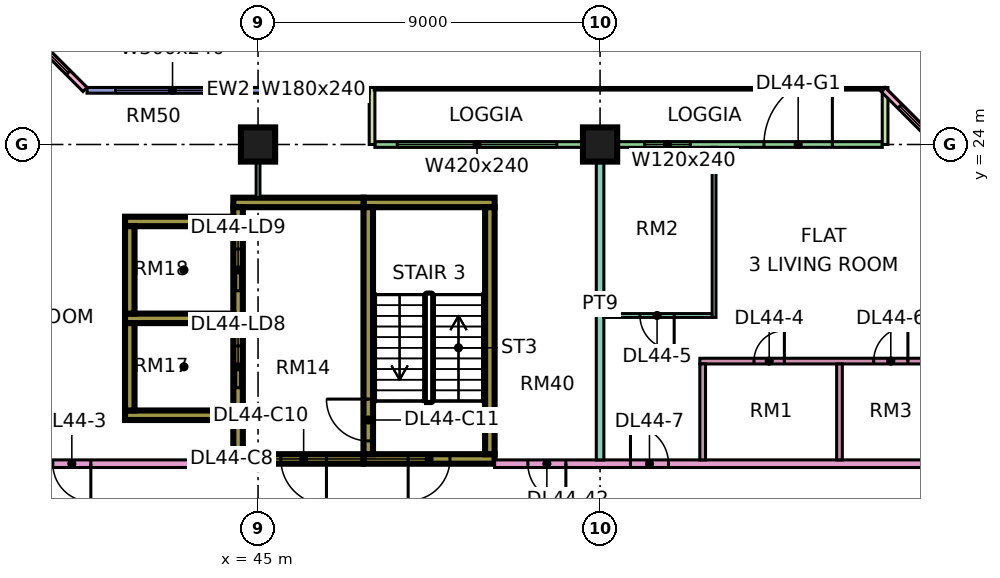
"""IFC4 building model, lengths in metres.
Left out: names, types, materials, properties, quantities, classifications, styles, units other than length and angle.
Written with IfcOpenShell. Run it as: python <this file> out.ifc"""

import sys

from ifc_helpers import new_model, si_unit, direction, frame, frame_2d, origin, origin_2d, place, context, subcontext, project, spatial, rectangle, extrude, element, fill, save


model = new_model("IFC4")
c1 = context("Model", 3, precision=1e-05, world=origin(), true_north=direction((0.0, 1.0)))
c2 = subcontext(c1, "Body", "Model", "MODEL_VIEW")
j1 = project(units=[si_unit("LENGTHUNIT", "METRE"), si_unit("PLANEANGLEUNIT", "RADIAN")], contexts=[c1])
p1 = place(None, origin())
s1 = spatial("IfcSite", under=j1, at=p1, CompositionType="ELEMENT")
p2 = place(p1, origin())
s2 = spatial("IfcBuilding", under=s1, at=p2, CompositionType="ELEMENT")
p3 = place(p2, frame((0.0, 0.0, 191.15)))
s3 = spatial("IfcBuildingStorey", under=s2, at=p3, CompositionType="ELEMENT", Elevation=191.15)
for number, where, z_axis, x_axis in (
    (1, (45.0, 24.0, 0.0), (0.0, 0.0, 1.0), (1.0, 0.0, 0.0)),
    (2, (54.0, 24.0, 0.0), (0.0, 0.0, 1.0), (1.0, 0.0, 0.0)),
):
    element("IfcColumn", number, at=place(p3, frame(where, z_axis=z_axis, x_axis=x_axis)), inside=s3, PredefinedType="COLUMN", context=c2, shape_type="SweptSolid", body=[
        extrude(rectangle(XDim=0.9, YDim=0.9, at=origin_2d()), origin(), (0.0, 0.0, 1.0), 3.75),
    ])
p4 = place(p3, frame((47.775, 15.725, 0.0), z_axis=(0.0, 0.0, 1.0), x_axis=(1.0, 0.0, 0.0)))
e3 = element("IfcWall", 3, at=p4, inside=s3, PredefinedType="SHEAR", context=c2, shape_type="SweptSolid", body=[
    extrude(rectangle(XDim=3.45, YDim=0.25, at=frame_2d((1.725, 0.0))), origin(), (0.0, 0.0, 1.0), 3.75),
])
p5 = place(p4, frame((1.175, 0.0, 0.0)))
e4 = element("IfcOpeningElement", 4, at=p5, cuts=e3, PredefinedType="OPENING", context=c2, shape_type="SweptSolid", body=[
    extrude(rectangle(XDim=1.1, YDim=2.2, at=frame_2d((0.55, 1.1))), frame((0.0, 0.135, 0.0), z_axis=(0.0, -1.0, 0.0), x_axis=(1.0, 0.0, 0.0)), (0.0, 0.0, 1.0), 0.27),
])
p6 = place(p3, frame((47.775, 22.475, 0.0), z_axis=(0.0, 0.0, 1.0), x_axis=(1.0, 0.0, 0.0)))
e5 = element("IfcWall", 5, at=p6, inside=s3, PredefinedType="SHEAR", context=c2, shape_type="SweptSolid", body=[
    extrude(rectangle(XDim=3.45, YDim=0.25, at=frame_2d((1.725, 0.0))), origin(), (0.0, 0.0, 1.0), 3.75),
])
p7 = place(p3, frame((47.9, 15.85, 0.0), z_axis=(0.0, 0.0, 1.0), x_axis=(0.0, 1.0, 0.0)))
e6 = element("IfcWall", 6, at=p7, inside=s3, PredefinedType="SHEAR", context=c2, shape_type="SweptSolid", body=[
    extrude(rectangle(XDim=6.5, YDim=0.25, at=frame_2d((3.25, 0.0))), origin(), (0.0, 0.0, 1.0), 3.75),
])
p8 = place(p7, frame((0.35, 0.0, 0.0)))
e7 = element("IfcOpeningElement", 7, at=p8, cuts=e6, PredefinedType="OPENING", context=c2, shape_type="SweptSolid", body=[
    extrude(rectangle(XDim=1.1, YDim=2.2, at=frame_2d((0.55, 1.1))), frame((0.0, 0.135, 0.0), z_axis=(0.0, -1.0, 0.0), x_axis=(1.0, 0.0, 0.0)), (0.0, 0.0, 1.0), 0.27),
])
p9 = place(p3, frame((51.1, 15.85, 0.0), z_axis=(0.0, 0.0, 1.0), x_axis=(0.0, 1.0, 0.0)))
e8 = element("IfcWall", 8, at=p9, inside=s3, PredefinedType="SHEAR", context=c2, shape_type="SweptSolid", body=[
    extrude(rectangle(XDim=6.5, YDim=0.25, at=frame_2d((3.25, 0.0))), origin(), (0.0, 0.0, 1.0), 3.75),
])
p10 = place(p3, frame((44.35, 15.725, 0.0), z_axis=(0.0, 0.0, 1.0), x_axis=(1.0, 0.0, 0.0)))
e9 = element("IfcWall", 9, at=p10, inside=s3, PredefinedType="SHEAR", context=c2, shape_type="SweptSolid", body=[
    extrude(rectangle(XDim=3.425, YDim=0.25, at=frame_2d((1.712, 0.0))), origin(), (0.0, 0.0, 1.0), 3.75),
])
p11 = place(p10, frame((1.25, 0.0, 0.0)))
e10 = element("IfcOpeningElement", 10, at=p11, cuts=e9, PredefinedType="OPENING", context=c2, shape_type="SweptSolid", body=[
    extrude(rectangle(XDim=1.2, YDim=2.2, at=frame_2d((0.6, 1.1))), frame((0.0, 0.135, 0.0), z_axis=(0.0, -1.0, 0.0), x_axis=(1.0, 0.0, 0.0)), (0.0, 0.0, 1.0), 0.27),
])
p12 = place(p3, frame((44.35, 22.475, 0.0), z_axis=(0.0, 0.0, 1.0), x_axis=(1.0, 0.0, 0.0)))
e11 = element("IfcWall", 11, at=p12, inside=s3, PredefinedType="SHEAR", context=c2, shape_type="SweptSolid", body=[
    extrude(rectangle(XDim=3.425, YDim=0.25, at=frame_2d((1.712, 0.0))), origin(), (0.0, 0.0, 1.0), 3.75),
])
p13 = place(p3, frame((44.475, 15.85, 0.0), z_axis=(0.0, 0.0, 1.0), x_axis=(0.0, 1.0, 0.0)))
e12 = element("IfcWall", 12, at=p13, inside=s3, PredefinedType="SHEAR", context=c2, shape_type="SweptSolid", body=[
    extrude(rectangle(XDim=6.5, YDim=0.25, at=frame_2d((3.25, 0.0))), origin(), (0.0, 0.0, 1.0), 3.75),
])
p14 = place(p13, frame((1.75, 0.0, 0.0)))
e13 = element("IfcOpeningElement", 13, at=p14, cuts=e12, PredefinedType="OPENING", context=c2, shape_type="SweptSolid", body=[
    extrude(rectangle(XDim=1.1, YDim=2.2, at=frame_2d((0.55, 1.1))), frame((0.0, 0.135, 0.0), z_axis=(0.0, -1.0, 0.0), x_axis=(1.0, 0.0, 0.0)), (0.0, 0.0, 1.0), 0.27),
])
p15 = place(p13, frame((4.3, 0.0, 0.0)))
e14 = element("IfcOpeningElement", 14, at=p15, cuts=e12, PredefinedType="OPENING", context=c2, shape_type="SweptSolid", body=[
    extrude(rectangle(XDim=1.1, YDim=2.2, at=frame_2d((0.55, 1.1))), frame((0.0, 0.135, 0.0), z_axis=(0.0, -1.0, 0.0), x_axis=(1.0, 0.0, 0.0)), (0.0, 0.0, 1.0), 0.27),
])
for number, where, z_axis, x_axis in (
    (15, (41.5, 16.875, 0.0), (0.0, 0.0, 1.0), (1.0, 0.0, 0.0)),
    (16, (41.5, 19.425, 0.0), (0.0, 0.0, 1.0), (1.0, 0.0, 0.0)),
    (17, (41.5, 21.975, 0.0), (0.0, 0.0, 1.0), (1.0, 0.0, 0.0)),
):
    element("IfcWall", number, at=place(p3, frame(where, z_axis=z_axis, x_axis=x_axis)), inside=s3, PredefinedType="SHEAR", context=c2, shape_type="SweptSolid", body=[
        extrude(rectangle(XDim=2.85, YDim=0.25, at=frame_2d((1.425, 0.0))), origin(), (0.0, 0.0, 1.0), 3.75),
    ])
for number, where, z_axis, x_axis in (
    (18, (41.625, 17.0, 0.0), (0.0, 0.0, 1.0), (0.0, 1.0, 0.0)),
    (19, (41.625, 19.55, 0.0), (0.0, 0.0, 1.0), (0.0, 1.0, 0.0)),
):
    element("IfcWall", number, at=place(p3, frame(where, z_axis=z_axis, x_axis=x_axis)), inside=s3, PredefinedType="SHEAR", context=c2, shape_type="SweptSolid", body=[
        extrude(rectangle(XDim=2.3, YDim=0.25, at=frame_2d((1.15, 0.0))), origin(), (0.0, 0.0, 1.0), 3.75),
    ])
p16 = place(p3, frame((61.425, 24.0, 0.0), z_axis=(0.0, 0.0, 1.0), x_axis=(-1.0, 0.0, 0.0)))
e20 = element("IfcWall", 20, at=p16, inside=s3, PredefinedType="SOLIDWALL", context=c2, shape_type="SweptSolid", body=[
    extrude(rectangle(XDim=13.35, YDim=0.15, at=frame_2d((6.675, 0.0))), origin(), (0.0, 0.0, 1.0), 3.35),
])
p17 = place(p16, frame((1.312, 0.0, 0.0)))
e21 = element("IfcOpeningElement", 21, at=p17, cuts=e20, PredefinedType="OPENING", context=c2, shape_type="SweptSolid", body=[
    extrude(rectangle(XDim=1.8, YDim=2.4, at=frame_2d((0.9, 1.2))), frame((0.0, 0.085, 0.0), z_axis=(0.0, -1.0, 0.0), x_axis=(1.0, 0.0, 0.0)), (0.0, 0.0, 1.0), 0.17),
])
p18 = place(p16, frame((5.05, 0.0, 0.45)))
e22 = element("IfcOpeningElement", 22, at=p18, cuts=e20, PredefinedType="OPENING", context=c2, shape_type="SweptSolid", body=[
    extrude(rectangle(XDim=1.2, YDim=2.4, at=frame_2d((0.6, 1.2))), frame((0.0, 0.085, 0.0), z_axis=(0.0, -1.0, 0.0), x_axis=(1.0, 0.0, 0.0)), (0.0, 0.0, 1.0), 0.17),
])
p19 = place(p16, frame((8.562, 0.0, 0.45)))
e23 = element("IfcOpeningElement", 23, at=p19, cuts=e20, PredefinedType="OPENING", context=c2, shape_type="SweptSolid", body=[
    extrude(rectangle(XDim=4.2, YDim=2.4, at=frame_2d((2.1, 1.2))), frame((0.0, 0.085, 0.0), z_axis=(0.0, -1.0, 0.0), x_axis=(1.0, 0.0, 0.0)), (0.0, 0.0, 1.0), 0.17),
])
for number, where, z_axis, x_axis in (
    (24, (61.5, 25.5, 0.0), (0.0, 0.0, 1.0), (0.0, -1.0, 0.0)),
    (25, (48.0, 25.5, 0.0), (0.0, 0.0, 1.0), (0.0, -1.0, 0.0)),
):
    element("IfcWall", number, at=place(p3, frame(where, z_axis=z_axis, x_axis=x_axis)), inside=s3, PredefinedType="SOLIDWALL", context=c2, shape_type="SweptSolid", body=[
        extrude(rectangle(XDim=1.5, YDim=0.15, at=frame_2d((0.75, 0.0))), origin(), (0.0, 0.0, 1.0), 3.35),
    ])
p20 = place(p3, frame((47.925, 25.425, 0.0), z_axis=(0.0, 0.0, 1.0), x_axis=(-1.0, 0.0, 0.0)))
e26 = element("IfcWall", 26, at=p20, inside=s3, PredefinedType="SOLIDWALL", context=c2, shape_type="SweptSolid", body=[
    extrude(rectangle(XDim=7.425, YDim=0.15, at=frame_2d((3.712, 0.0))), origin(), (0.0, 0.0, 1.0), 3.35),
])
p21 = place(p20, frame((0.562, 0.0, 0.45)))
e27 = element("IfcOpeningElement", 27, at=p21, cuts=e26, PredefinedType="OPENING", context=c2, shape_type="SweptSolid", body=[
    extrude(rectangle(XDim=1.8, YDim=2.4, at=frame_2d((0.9, 1.2))), frame((0.0, 0.085, 0.0), z_axis=(0.0, -1.0, 0.0), x_axis=(1.0, 0.0, 0.0)), (0.0, 0.0, 1.0), 0.17),
])
p22 = place(p20, frame((3.675, 0.0, 0.45)))
e28 = element("IfcOpeningElement", 28, at=p22, cuts=e26, PredefinedType="OPENING", context=c2, shape_type="SweptSolid", body=[
    extrude(rectangle(XDim=3.0, YDim=2.4, at=frame_2d((1.5, 1.2))), frame((0.0, 0.085, 0.0), z_axis=(0.0, -1.0, 0.0), x_axis=(1.0, 0.0, 0.0)), (0.0, 0.0, 1.0), 0.17),
])
p23 = place(p3, frame((40.447, 25.447, 0.0), z_axis=(0.0, 0.0, 1.0), x_axis=(-0.707106781187, 0.707106781187, 0.0)))
e29 = element("IfcWall", 29, at=p23, inside=s3, PredefinedType="SOLIDWALL", context=c2, shape_type="SweptSolid", body=[
    extrude(rectangle(XDim=4.243, YDim=0.15, at=frame_2d((2.121, 0.0))), origin(), (0.0, 0.0, 1.0), 3.35),
])
p24 = place(p23, frame((0.621, 0.0, 0.45)))
e30 = element("IfcOpeningElement", 30, at=p24, cuts=e29, PredefinedType="OPENING", context=c2, shape_type="SweptSolid", body=[
    extrude(rectangle(XDim=3.0, YDim=2.4, at=frame_2d((1.5, 1.2))), frame((0.0, 0.085, 0.0), z_axis=(0.0, -1.0, 0.0), x_axis=(1.0, 0.0, 0.0)), (0.0, 0.0, 1.0), 0.17),
])
p25 = place(p3, frame((64.447, 22.447, 0.0), z_axis=(0.0, 0.0, 1.0), x_axis=(-0.707106781187, 0.707106781187, 0.0)))
e31 = element("IfcWall", 31, at=p25, inside=s3, PredefinedType="SOLIDWALL", context=c2, shape_type="SweptSolid", body=[
    extrude(rectangle(XDim=4.243, YDim=0.15, at=frame_2d((2.121, 0.0))), origin(), (0.0, 0.0, 1.0), 3.35),
])
p26 = place(p25, frame((0.621, 0.0, 0.45)))
e32 = element("IfcOpeningElement", 32, at=p26, cuts=e31, PredefinedType="OPENING", context=c2, shape_type="SweptSolid", body=[
    extrude(rectangle(XDim=3.0, YDim=2.4, at=frame_2d((1.5, 1.2))), frame((0.0, 0.085, 0.0), z_axis=(0.0, -1.0, 0.0), x_axis=(1.0, 0.0, 0.0)), (0.0, 0.0, 1.0), 0.17),
])
p27 = place(p3, frame((34.0, 15.6, 0.0), z_axis=(0.0, 0.0, 1.0), x_axis=(1.0, 0.0, 0.0)))
e33 = element("IfcWall", 33, at=p27, inside=s3, PredefinedType="PARTITIONING", context=c2, shape_type="SweptSolid", body=[
    extrude(rectangle(XDim=10.35, YDim=0.2, at=frame_2d((5.175, 0.0))), origin(), (0.0, 0.0, 1.0), 3.35),
])
p28 = place(p27, frame((5.6, 0.0, 0.0)))
e34 = element("IfcOpeningElement", 34, at=p28, cuts=e33, PredefinedType="OPENING", context=c2, shape_type="SweptSolid", body=[
    extrude(rectangle(XDim=1.0, YDim=2.1, at=frame_2d((0.5, 1.05))), frame((0.0, 0.11, 0.0), z_axis=(0.0, -1.0, 0.0), x_axis=(1.0, 0.0, 0.0)), (0.0, 0.0, 1.0), 0.22),
])
p29 = place(p27, frame((0.45, 0.0, 0.0)))
e35 = element("IfcOpeningElement", 35, at=p29, cuts=e33, PredefinedType="OPENING", context=c2, shape_type="SweptSolid", body=[
    extrude(rectangle(XDim=1.2, YDim=2.1, at=frame_2d((0.6, 1.05))), frame((0.0, 0.11, 0.0), z_axis=(0.0, -1.0, 0.0), x_axis=(1.0, 0.0, 0.0)), (0.0, 0.0, 1.0), 0.22),
])
p30 = place(p3, frame((45.0, 22.6, 0.0), z_axis=(0.0, 0.0, 1.0), x_axis=(0.0, 1.0, 0.0)))
e36 = element("IfcWall", 36, at=p30, inside=s3, PredefinedType="PARTITIONING", context=c2, shape_type="SweptSolid", body=[
    extrude(rectangle(XDim=1.4, YDim=0.1, at=frame_2d((0.7, 0.0))), origin(), (0.0, 0.0, 1.0), 3.35),
])
p31 = place(p3, frame((51.225, 15.6, 0.0), z_axis=(0.0, 0.0, 1.0), x_axis=(1.0, 0.0, 0.0)))
e37 = element("IfcWall", 37, at=p31, inside=s3, PredefinedType="PARTITIONING", context=c2, shape_type="SweptSolid", body=[
    extrude(rectangle(XDim=13.125, YDim=0.2, at=frame_2d((6.562, 0.0))), origin(), (0.0, 0.0, 1.0), 3.35),
])
p32 = place(p31, frame((3.575, 0.0, 0.0)))
e38 = element("IfcOpeningElement", 38, at=p32, cuts=e37, PredefinedType="OPENING", context=c2, shape_type="SweptSolid", body=[
    extrude(rectangle(XDim=1.0, YDim=2.1, at=frame_2d((0.5, 1.05))), frame((0.0, 0.11, 0.0), z_axis=(0.0, -1.0, 0.0), x_axis=(1.0, 0.0, 0.0)), (0.0, 0.0, 1.0), 0.22),
])
p33 = place(p31, frame((0.875, 0.0, 0.0)))
e39 = element("IfcOpeningElement", 39, at=p33, cuts=e37, PredefinedType="OPENING", context=c2, shape_type="SweptSolid", body=[
    extrude(rectangle(XDim=1.0, YDim=2.1, at=frame_2d((0.5, 1.05))), frame((0.0, 0.11, 0.0), z_axis=(0.0, -1.0, 0.0), x_axis=(1.0, 0.0, 0.0)), (0.0, 0.0, 1.0), 0.22),
])
p34 = place(p3, frame((54.0, 15.7, 0.0), z_axis=(0.0, 0.0, 1.0), x_axis=(0.0, 1.0, 0.0)))
e40 = element("IfcWall", 40, at=p34, inside=s3, PredefinedType="PARTITIONING", context=c2, shape_type="SweptSolid", body=[
    extrude(rectangle(XDim=8.226, YDim=0.2, at=frame_2d((4.113, 0.0))), origin(), (0.0, 0.0, 1.0), 3.35),
])
p35 = place(p3, frame((54.1, 19.5, 0.0), z_axis=(0.0, 0.0, 1.0), x_axis=(1.0, 0.0, 0.0)))
e41 = element("IfcWall", 41, at=p35, inside=s3, PredefinedType="PARTITIONING", context=c2, shape_type="SweptSolid", body=[
    extrude(rectangle(XDim=2.85, YDim=0.1, at=frame_2d((1.425, 0.0))), origin(), (0.0, 0.0, 1.0), 3.35),
])
p36 = place(p35, frame((0.95, 0.0, 0.0)))
e42 = element("IfcOpeningElement", 42, at=p36, cuts=e41, PredefinedType="OPENING", context=c2, shape_type="SweptSolid", body=[
    extrude(rectangle(XDim=0.9, YDim=2.1, at=frame_2d((0.45, 1.05))), frame((0.0, 0.06, 0.0), z_axis=(0.0, -1.0, 0.0), x_axis=(1.0, 0.0, 0.0)), (0.0, 0.0, 1.0), 0.12),
])
p37 = place(p3, frame((56.625, 18.3, 0.0), z_axis=(0.0, 0.0, 1.0), x_axis=(1.0, 0.0, 0.0)))
e43 = element("IfcWall", 43, at=p37, inside=s3, PredefinedType="PARTITIONING", context=c2, shape_type="SweptSolid", body=[
    extrude(rectangle(XDim=7.725, YDim=0.15, at=frame_2d((3.863, 0.0))), origin(), (0.0, 0.0, 1.0), 3.35),
])
p38 = place(p37, frame((1.425, 0.0, 0.0)))
e44 = element("IfcOpeningElement", 44, at=p38, cuts=e43, PredefinedType="OPENING", context=c2, shape_type="SweptSolid", body=[
    extrude(rectangle(XDim=0.8, YDim=2.1, at=frame_2d((0.4, 1.05))), frame((0.0, 0.085, 0.0), z_axis=(0.0, -1.0, 0.0), x_axis=(1.0, 0.0, 0.0)), (0.0, 0.0, 1.0), 0.17),
])
p39 = place(p37, frame((4.575, 0.0, 0.0)))
e45 = element("IfcOpeningElement", 45, at=p39, cuts=e43, PredefinedType="OPENING", context=c2, shape_type="SweptSolid", body=[
    extrude(rectangle(XDim=0.9, YDim=2.1, at=frame_2d((0.45, 1.05))), frame((0.0, 0.085, 0.0), z_axis=(0.0, -1.0, 0.0), x_axis=(1.0, 0.0, 0.0)), (0.0, 0.0, 1.0), 0.17),
])
p40 = place(p3, frame((56.7, 15.7, 0.0), z_axis=(0.0, 0.0, 1.0), x_axis=(0.0, 1.0, 0.0)))
e46 = element("IfcWall", 46, at=p40, inside=s3, PredefinedType="PARTITIONING", context=c2, shape_type="SweptSolid", body=[
    extrude(rectangle(XDim=2.525, YDim=0.15, at=frame_2d((1.263, 0.0))), origin(), (0.0, 0.0, 1.0), 3.35),
])
p41 = place(p3, frame((57.0, 19.45, 0.0), z_axis=(0.0, 0.0, 1.0), x_axis=(0.0, 1.0, 0.0)))
e47 = element("IfcWall", 47, at=p41, inside=s3, PredefinedType="PARTITIONING", context=c2, shape_type="SweptSolid", body=[
    extrude(rectangle(XDim=4.476, YDim=0.1, at=frame_2d((2.238, 0.0))), origin(), (0.0, 0.0, 1.0), 3.35),
])
p42 = place(p3, frame((60.3, 15.7, 0.0), z_axis=(0.0, 0.0, 1.0), x_axis=(0.0, 1.0, 0.0)))
e48 = element("IfcWall", 48, at=p42, inside=s3, PredefinedType="PARTITIONING", context=c2, shape_type="SweptSolid", body=[
    extrude(rectangle(XDim=2.525, YDim=0.15, at=frame_2d((1.263, 0.0))), origin(), (0.0, 0.0, 1.0), 3.35),
])
p43 = place(p17, frame((1.8, 0.0, 0.0), z_axis=(0.0, 0.0, 1.0), x_axis=(-1.0, 0.0, 0.0)))
e49 = element("IfcDoor", 49, at=p43, inside=s3, OperationType="DOUBLE_DOOR_SINGLE_SWING", PredefinedType="DOOR", context=c2, shape_type="SweptSolid", body=[
    extrude(rectangle(XDim=1.8, YDim=2.4, at=frame_2d((0.9, 1.2))), frame((0.0, 0.025, 0.0), z_axis=(0.0, -1.0, 0.0), x_axis=(1.0, 0.0, 0.0)), (0.0, 0.0, 1.0), 0.05),
])
fill(e21, e49)
p44 = place(p18, origin())
e50 = element("IfcWindow", 50, at=p44, inside=s3, PartitioningType="SINGLE_PANEL", PredefinedType="WINDOW", context=c2, shape_type="SweptSolid", body=[
    extrude(rectangle(XDim=1.2, YDim=2.4, at=frame_2d((0.6, 1.2))), frame((0.0, 0.03, 0.0), z_axis=(0.0, -1.0, 0.0), x_axis=(1.0, 0.0, 0.0)), (0.0, 0.0, 1.0), 0.06),
])
fill(e22, e50)
p45 = place(p19, origin())
e51 = element("IfcWindow", 51, at=p45, inside=s3, PartitioningType="SINGLE_PANEL", PredefinedType="WINDOW", context=c2, shape_type="SweptSolid", body=[
    extrude(rectangle(XDim=4.2, YDim=2.4, at=frame_2d((2.1, 1.2))), frame((0.0, 0.03, 0.0), z_axis=(0.0, -1.0, 0.0), x_axis=(1.0, 0.0, 0.0)), (0.0, 0.0, 1.0), 0.06),
])
fill(e23, e51)
p46 = place(p21, origin())
e52 = element("IfcWindow", 52, at=p46, inside=s3, PartitioningType="SINGLE_PANEL", PredefinedType="WINDOW", context=c2, shape_type="SweptSolid", body=[
    extrude(rectangle(XDim=1.8, YDim=2.4, at=frame_2d((0.9, 1.2))), frame((0.0, 0.03, 0.0), z_axis=(0.0, -1.0, 0.0), x_axis=(1.0, 0.0, 0.0)), (0.0, 0.0, 1.0), 0.06),
])
fill(e27, e52)
p47 = place(p22, origin())
e53 = element("IfcWindow", 53, at=p47, inside=s3, PartitioningType="SINGLE_PANEL", PredefinedType="WINDOW", context=c2, shape_type="SweptSolid", body=[
    extrude(rectangle(XDim=3.0, YDim=2.4, at=frame_2d((1.5, 1.2))), frame((0.0, 0.03, 0.0), z_axis=(0.0, -1.0, 0.0), x_axis=(1.0, 0.0, 0.0)), (0.0, 0.0, 1.0), 0.06),
])
fill(e28, e53)
p48 = place(p24, origin())
e54 = element("IfcWindow", 54, at=p48, inside=s3, PartitioningType="SINGLE_PANEL", PredefinedType="WINDOW", context=c2, shape_type="SweptSolid", body=[
    extrude(rectangle(XDim=3.0, YDim=2.4, at=frame_2d((1.5, 1.2))), frame((0.0, 0.03, 0.0), z_axis=(0.0, -1.0, 0.0), x_axis=(1.0, 0.0, 0.0)), (0.0, 0.0, 1.0), 0.06),
])
fill(e30, e54)
p49 = place(p26, origin())
e55 = element("IfcWindow", 55, at=p49, inside=s3, PartitioningType="SINGLE_PANEL", PredefinedType="WINDOW", context=c2, shape_type="SweptSolid", body=[
    extrude(rectangle(XDim=3.0, YDim=2.4, at=frame_2d((1.5, 1.2))), frame((0.0, 0.03, 0.0), z_axis=(0.0, -1.0, 0.0), x_axis=(1.0, 0.0, 0.0)), (0.0, 0.0, 1.0), 0.06),
])
fill(e32, e55)
p50 = place(p5, frame((1.1, 0.0, 0.0), z_axis=(0.0, 0.0, 1.0), x_axis=(-1.0, 0.0, 0.0)))
e56 = element("IfcDoor", 56, at=p50, inside=s3, OperationType="SINGLE_SWING_LEFT", PredefinedType="DOOR", context=c2, shape_type="SweptSolid", body=[
    extrude(rectangle(XDim=1.1, YDim=2.2, at=frame_2d((0.55, 1.1))), frame((0.0, 0.025, 0.0), z_axis=(0.0, -1.0, 0.0), x_axis=(1.0, 0.0, 0.0)), (0.0, 0.0, 1.0), 0.05),
])
fill(e4, e56)
p51 = place(p11, origin())
e57 = element("IfcDoor", 57, at=p51, inside=s3, OperationType="SINGLE_SWING_RIGHT", PredefinedType="DOOR", context=c2, shape_type="SweptSolid", body=[
    extrude(rectangle(XDim=1.2, YDim=2.2, at=frame_2d((0.6, 1.1))), frame((0.0, 0.025, 0.0), z_axis=(0.0, -1.0, 0.0), x_axis=(1.0, 0.0, 0.0)), (0.0, 0.0, 1.0), 0.05),
])
fill(e10, e57)
p52 = place(p8, frame((1.1, 0.0, 0.0), z_axis=(0.0, 0.0, 1.0), x_axis=(-1.0, 0.0, 0.0)))
e58 = element("IfcDoor", 58, at=p52, inside=s3, OperationType="SINGLE_SWING_RIGHT", PredefinedType="DOOR", context=c2, shape_type="SweptSolid", body=[
    extrude(rectangle(XDim=1.1, YDim=2.2, at=frame_2d((0.55, 1.1))), frame((0.0, 0.025, 0.0), z_axis=(0.0, -1.0, 0.0), x_axis=(1.0, 0.0, 0.0)), (0.0, 0.0, 1.0), 0.05),
])
fill(e7, e58)
p53 = place(p14, origin())
e59 = element("IfcDoor", 59, at=p53, inside=s3, OperationType="DOUBLE_DOOR_SLIDING", PredefinedType="DOOR", context=c2, shape_type="SweptSolid", body=[
    extrude(rectangle(XDim=1.1, YDim=2.2, at=frame_2d((0.55, 1.1))), frame((0.0, 0.025, 0.0), z_axis=(0.0, -1.0, 0.0), x_axis=(1.0, 0.0, 0.0)), (0.0, 0.0, 1.0), 0.05),
])
fill(e13, e59)
p54 = place(p15, origin())
e60 = element("IfcDoor", 60, at=p54, inside=s3, OperationType="DOUBLE_DOOR_SLIDING", PredefinedType="DOOR", context=c2, shape_type="SweptSolid", body=[
    extrude(rectangle(XDim=1.1, YDim=2.2, at=frame_2d((0.55, 1.1))), frame((0.0, 0.025, 0.0), z_axis=(0.0, -1.0, 0.0), x_axis=(1.0, 0.0, 0.0)), (0.0, 0.0, 1.0), 0.05),
])
fill(e14, e60)
p55 = place(p28, origin())
e61 = element("IfcDoor", 61, at=p55, inside=s3, OperationType="SINGLE_SWING_RIGHT", PredefinedType="DOOR", context=c2, shape_type="SweptSolid", body=[
    extrude(rectangle(XDim=1.0, YDim=2.1, at=frame_2d((0.5, 1.05))), frame((0.0, 0.025, 0.0), z_axis=(0.0, -1.0, 0.0), x_axis=(1.0, 0.0, 0.0)), (0.0, 0.0, 1.0), 0.05),
])
fill(e34, e61)
p56 = place(p38, frame((0.8, 0.0, 0.0), z_axis=(0.0, 0.0, 1.0), x_axis=(-1.0, 0.0, 0.0)))
e62 = element("IfcDoor", 62, at=p56, inside=s3, OperationType="SINGLE_SWING_RIGHT", PredefinedType="DOOR", context=c2, shape_type="SweptSolid", body=[
    extrude(rectangle(XDim=0.8, YDim=2.1, at=frame_2d((0.4, 1.05))), frame((0.0, 0.025, 0.0), z_axis=(0.0, -1.0, 0.0), x_axis=(1.0, 0.0, 0.0)), (0.0, 0.0, 1.0), 0.05),
])
fill(e44, e62)
p57 = place(p36, origin())
e63 = element("IfcDoor", 63, at=p57, inside=s3, OperationType="SINGLE_SWING_RIGHT", PredefinedType="DOOR", context=c2, shape_type="SweptSolid", body=[
    extrude(rectangle(XDim=0.9, YDim=2.1, at=frame_2d((0.45, 1.05))), frame((0.0, 0.025, 0.0), z_axis=(0.0, -1.0, 0.0), x_axis=(1.0, 0.0, 0.0)), (0.0, 0.0, 1.0), 0.05),
])
fill(e42, e63)
p58 = place(p39, frame((0.9, 0.0, 0.0), z_axis=(0.0, 0.0, 1.0), x_axis=(-1.0, 0.0, 0.0)))
e64 = element("IfcDoor", 64, at=p58, inside=s3, OperationType="SINGLE_SWING_RIGHT", PredefinedType="DOOR", context=c2, shape_type="SweptSolid", body=[
    extrude(rectangle(XDim=0.9, YDim=2.1, at=frame_2d((0.45, 1.05))), frame((0.0, 0.025, 0.0), z_axis=(0.0, -1.0, 0.0), x_axis=(1.0, 0.0, 0.0)), (0.0, 0.0, 1.0), 0.05),
])
fill(e45, e64)
p59 = place(p32, origin())
e65 = element("IfcDoor", 65, at=p59, inside=s3, OperationType="SINGLE_SWING_LEFT", PredefinedType="DOOR", context=c2, shape_type="SweptSolid", body=[
    extrude(rectangle(XDim=1.0, YDim=2.1, at=frame_2d((0.5, 1.05))), frame((0.0, 0.025, 0.0), z_axis=(0.0, -1.0, 0.0), x_axis=(1.0, 0.0, 0.0)), (0.0, 0.0, 1.0), 0.05),
])
fill(e38, e65)
p60 = place(p33, origin())
e66 = element("IfcDoor", 66, at=p60, inside=s3, OperationType="SINGLE_SWING_RIGHT", PredefinedType="DOOR", context=c2, shape_type="SweptSolid", body=[
    extrude(rectangle(XDim=1.0, YDim=2.1, at=frame_2d((0.5, 1.05))), frame((0.0, 0.025, 0.0), z_axis=(0.0, -1.0, 0.0), x_axis=(1.0, 0.0, 0.0)), (0.0, 0.0, 1.0), 0.05),
])
fill(e39, e66)
save(model, sys.argv[1])
